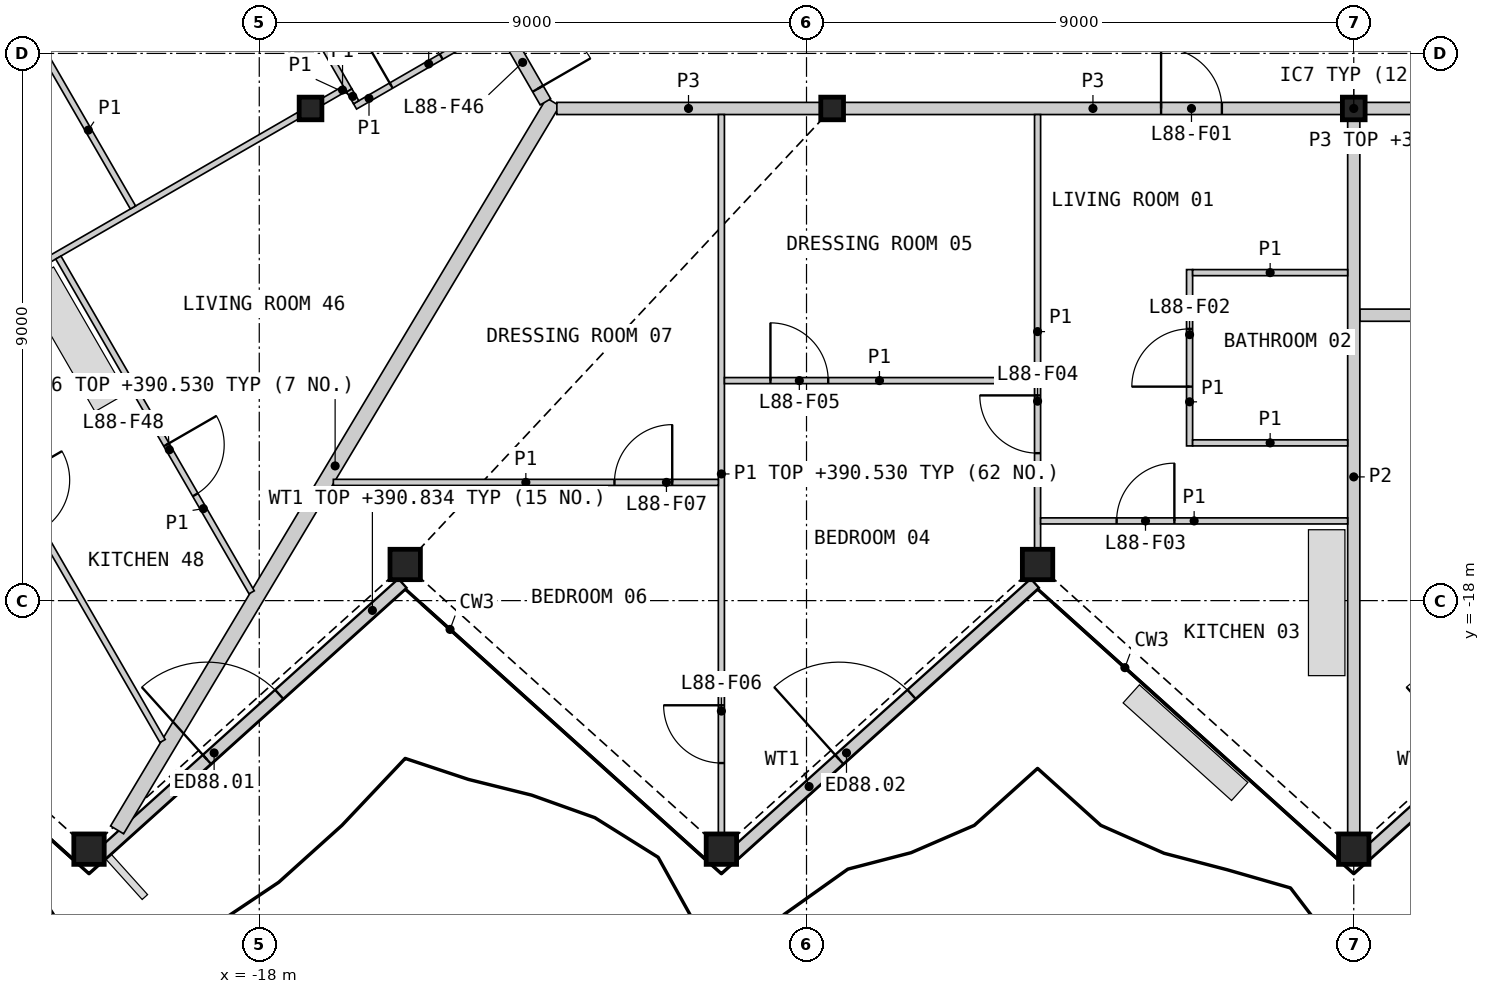
"""IFC4 building model, lengths in metres.
Left out: names, types, materials, properties, quantities, classifications, styles, units other than length and angle.
Written with IfcOpenShell. Run it as: python <this file> out.ifc"""

import sys

from ifc_helpers import new_model, si_unit, direction, frame, frame_2d, origin, origin_2d, place, context, subcontext, project, spatial, rectangle, hollow_rectangle, i_section, extrude, element, fill, save


model = new_model("IFC4")
c1 = context("Model", 3, precision=1e-05, world=origin(), true_north=direction((0.0, 1.0)))
c2 = subcontext(c1, "Body", "Model", "MODEL_VIEW")
j1 = project(units=[si_unit("LENGTHUNIT", "METRE"), si_unit("PLANEANGLEUNIT", "RADIAN")], contexts=[c1])
p1 = place(None, origin())
s1 = spatial("IfcSite", under=j1, at=p1, CompositionType="ELEMENT")
p2 = place(p1, origin())
s2 = spatial("IfcBuilding", under=s1, at=p2, CompositionType="ELEMENT")
p3 = place(p2, frame((0.0, 0.0, 388.2)))
s3 = spatial("IfcBuildingStorey", under=s2, at=p3, CompositionType="ELEMENT", Elevation=388.2)
for number, where, z_axis, x_axis in (
    (1, (-20.8, -22.088, 0.0), (0.0, 0.0, 1.0), (1.0, 0.0, 0.0)),
    (2, (-15.6, -17.406, 0.0), (0.0, 0.0, 1.0), (1.0, 0.0, 0.0)),
    (3, (-10.4, -22.088, 0.0), (0.0, 0.0, 1.0), (1.0, 0.0, 0.0)),
    (4, (-5.2, -17.406, 0.0), (0.0, 0.0, 1.0), (1.0, 0.0, 0.0)),
    (5, (0.0, -22.088, 0.0), (0.0, 0.0, 1.0), (1.0, 0.0, 0.0)),
):
    element("IfcColumn", number, at=place(p3, frame(where, z_axis=z_axis, x_axis=x_axis)), inside=s3, PredefinedType="COLUMN", context=c2, shape_type="SweptSolid", body=[
        extrude(hollow_rectangle(XDim=0.5, YDim=0.5, WallThickness=0.03, at=origin_2d()), origin(), (0.0, 0.0, 1.0), 3.4),
    ])
for number, where, z_axis, x_axis in (
    (6, (-17.157, -9.906, 0.0), (0.0, 0.0, 1.0), (1.0, 0.0, 0.0)),
    (7, (-8.578, -9.906, 0.0), (0.0, 0.0, 1.0), (1.0, 0.0, 0.0)),
    (8, (0.0, -9.906, 0.0), (0.0, 0.0, 1.0), (1.0, 0.0, 0.0)),
):
    element("IfcColumn", number, at=place(p3, frame(where, z_axis=z_axis, x_axis=x_axis)), inside=s3, PredefinedType="COLUMN", context=c2, shape_type="SweptSolid", body=[
        extrude(i_section(OverallWidth=0.374, OverallDepth=0.372, WebThickness=0.016, FlangeThickness=0.026, at=origin_2d()), origin(), (0.0, 0.0, 1.0), 3.4),
    ])
p4 = place(p3, frame((-20.595, -22.173, 0.0), z_axis=(0.0, 0.0, 1.0), x_axis=(0.743135582201, 0.669140871915, 0.0)))
e9 = element("IfcWall", 9, at=p4, inside=s3, PredefinedType="SOLIDWALL", context=c2, shape_type="SweptSolid", body=[
    extrude(rectangle(XDim=6.662, YDim=0.2, at=frame_2d((3.331, 0.0))), origin(), (0.0, 0.0, 1.0), 2.634),
])
p5 = place(p4, frame((2.333, 0.0, 0.0)))
e10 = element("IfcOpeningElement", 10, at=p5, cuts=e9, PredefinedType="OPENING", context=c2, shape_type="SweptSolid", body=[
    extrude(rectangle(XDim=1.6, YDim=2.25, at=frame_2d((0.8, 1.125))), frame((0.0, 0.11, 0.0), z_axis=(0.0, -1.0, 0.0), x_axis=(1.0, 0.0, 0.0)), (0.0, 0.0, 1.0), 0.22),
])
p6 = place(p3, frame((-10.195, -22.173, 0.0), z_axis=(0.0, 0.0, 1.0), x_axis=(0.743119171875, 0.669159096473, 0.0)))
e11 = element("IfcWall", 11, at=p6, inside=s3, PredefinedType="SOLIDWALL", context=c2, shape_type="SweptSolid", body=[
    extrude(rectangle(XDim=6.661, YDim=0.2, at=frame_2d((3.331, 0.0))), origin(), (0.0, 0.0, 1.0), 2.634),
])
p7 = place(p6, frame((2.333, 0.0, 0.0)))
e12 = element("IfcOpeningElement", 12, at=p7, cuts=e11, PredefinedType="OPENING", context=c2, shape_type="SweptSolid", body=[
    extrude(rectangle(XDim=1.6, YDim=2.25, at=frame_2d((0.8, 1.125))), frame((0.0, 0.11, 0.0), z_axis=(0.0, -1.0, 0.0), x_axis=(1.0, 0.0, 0.0)), (0.0, 0.0, 1.0), 0.22),
])
p8 = place(p3, frame((0.205, -22.173, 0.0), z_axis=(0.0, 0.0, 1.0), x_axis=(0.743135582201, 0.669140871915, 0.0)))
e13 = element("IfcWall", 13, at=p8, inside=s3, PredefinedType="SOLIDWALL", context=c2, shape_type="SweptSolid", body=[
    extrude(rectangle(XDim=6.662, YDim=0.2, at=frame_2d((3.331, 0.0))), origin(), (0.0, 0.0, 1.0), 2.634),
])
p9 = place(p8, frame((2.333, 0.0, 0.0)))
e14 = element("IfcOpeningElement", 14, at=p9, cuts=e13, PredefinedType="OPENING", context=c2, shape_type="SweptSolid", body=[
    extrude(rectangle(XDim=1.6, YDim=2.25, at=frame_2d((0.8, 1.125))), frame((0.0, 0.11, 0.0), z_axis=(0.0, -1.0, 0.0), x_axis=(1.0, 0.0, 0.0)), (0.0, 0.0, 1.0), 0.22),
])
p10 = place(p3, frame((-20.338, -21.771, 0.0), z_axis=(0.0, 0.0, 1.0), x_axis=(0.513878217441, 0.857863146218, 0.0)))
e15 = element("IfcWall", 15, at=p10, inside=s3, PredefinedType="PARTITIONING", context=c2, shape_type="SweptSolid", body=[
    extrude(rectangle(XDim=13.956, YDim=0.25, at=frame_2d((6.978, 0.0))), origin(), (0.0, 0.0, 1.0), 2.33),
])
p11 = place(p3, frame((0.197, -9.906, 0.0), z_axis=(0.0, 0.0, 1.0), x_axis=(1.0, 0.0, 0.0)))
e16 = element("IfcWall", 16, at=p11, inside=s3, PredefinedType="PARTITIONING", context=c2, shape_type="SweptSolid", body=[
    extrude(rectangle(XDim=8.185, YDim=0.2, at=frame_2d((4.092, 0.0))), origin(), (0.0, 0.0, 1.0), 3.1),
])
p12 = place(p11, frame((3.567, 0.0, 0.0)))
e17 = element("IfcOpeningElement", 17, at=p12, cuts=e16, PredefinedType="OPENING", context=c2, shape_type="SweptSolid", body=[
    extrude(rectangle(XDim=0.95, YDim=2.1, at=frame_2d((0.475, 1.05))), frame((0.0, 0.11, 0.0), z_axis=(0.0, -1.0, 0.0), x_axis=(1.0, 0.0, 0.0)), (0.0, 0.0, 1.0), 0.22),
])
p13 = place(p3, frame((-8.382, -9.906, 0.0), z_axis=(0.0, 0.0, 1.0), x_axis=(1.0, 0.0, 0.0)))
e18 = element("IfcWall", 18, at=p13, inside=s3, PredefinedType="PARTITIONING", context=c2, shape_type="SweptSolid", body=[
    extrude(rectangle(XDim=8.185, YDim=0.2, at=frame_2d((4.092, 0.0))), origin(), (0.0, 0.0, 1.0), 3.1),
])
p14 = place(p13, frame((5.213, 0.0, 0.0)))
e19 = element("IfcOpeningElement", 19, at=p14, cuts=e18, PredefinedType="OPENING", context=c2, shape_type="SweptSolid", body=[
    extrude(rectangle(XDim=1.0, YDim=2.1, at=frame_2d((0.5, 1.05))), frame((0.0, 0.11, 0.0), z_axis=(0.0, -1.0, 0.0), x_axis=(1.0, 0.0, 0.0)), (0.0, 0.0, 1.0), 0.22),
])
p15 = place(p3, frame((-13.106, -9.906, 0.0), z_axis=(0.0, 0.0, 1.0), x_axis=(1.0, 0.0, 0.0)))
e20 = element("IfcWall", 20, at=p15, inside=s3, PredefinedType="PARTITIONING", context=c2, shape_type="SweptSolid", body=[
    extrude(rectangle(XDim=4.331, YDim=0.2, at=frame_2d((2.165, 0.0))), origin(), (0.0, 0.0, 1.0), 3.1),
])
p16 = place(p3, frame((-15.131, -6.614, 0.0), z_axis=(0.0, 0.0, 1.0), x_axis=(0.499967746641, -0.866044024469, 0.0)))
e21 = element("IfcWall", 21, at=p16, inside=s3, PredefinedType="PARTITIONING", context=c2, shape_type="SweptSolid", body=[
    extrude(rectangle(XDim=3.676, YDim=0.2, at=frame_2d((1.838, 0.0))), origin(), (0.0, 0.0, 1.0), 3.1),
])
p17 = place(p16, frame((2.426, 0.0, 0.0)))
e22 = element("IfcOpeningElement", 22, at=p17, cuts=e21, PredefinedType="OPENING", context=c2, shape_type="SweptSolid", body=[
    extrude(rectangle(XDim=1.0, YDim=2.1, at=frame_2d((0.5, 1.05))), frame((0.0, 0.11, 0.0), z_axis=(0.0, -1.0, 0.0), x_axis=(1.0, 0.0, 0.0)), (0.0, 0.0, 1.0), 0.22),
])
p18 = place(p3, frame((0.1, -13.306, 0.0), z_axis=(0.0, 0.0, 1.0), x_axis=(1.0, 0.0, 0.0)))
e23 = element("IfcWall", 23, at=p18, inside=s3, PredefinedType="PARTITIONING", context=c2, shape_type="SweptSolid", body=[
    extrude(rectangle(XDim=15.094, YDim=0.2, at=frame_2d((7.547, 0.0))), origin(), (0.0, 0.0, 1.0), 2.33),
])
p19 = place(p18, frame((9.781, 0.0, 0.0)))
e24 = element("IfcOpeningElement", 24, at=p19, cuts=e23, PredefinedType="OPENING", context=c2, shape_type="SweptSolid", body=[
    extrude(rectangle(XDim=0.95, YDim=2.1, at=frame_2d((0.475, 1.05))), frame((0.0, 0.11, 0.0), z_axis=(0.0, -1.0, 0.0), x_axis=(1.0, 0.0, 0.0)), (0.0, 0.0, 1.0), 0.22),
])
p20 = place(p3, frame((0.0, -21.828, 0.0), z_axis=(0.0, 0.0, 1.0), x_axis=(0.0, 1.0, 0.0)))
e25 = element("IfcWall", 25, at=p20, inside=s3, PredefinedType="PARTITIONING", context=c2, shape_type="SweptSolid", body=[
    extrude(rectangle(XDim=11.725, YDim=0.2, at=frame_2d((5.863, 0.0))), origin(), (0.0, 0.0, 1.0), 2.33),
])
p21 = place(p3, frame((-10.4, -21.828, 0.0), z_axis=(0.0, 0.0, 1.0), x_axis=(0.0, 1.0, 0.0)))
e26 = element("IfcWall", 26, at=p21, inside=s3, PredefinedType="PARTITIONING", context=c2, shape_type="SweptSolid", body=[
    extrude(rectangle(XDim=11.822, YDim=0.1, at=frame_2d((5.911, 0.0))), origin(), (0.0, 0.0, 1.0), 2.33),
])
p22 = place(p21, frame((1.156, 0.0, 0.0)))
e27 = element("IfcOpeningElement", 27, at=p22, cuts=e26, PredefinedType="OPENING", context=c2, shape_type="SweptSolid", body=[
    extrude(rectangle(XDim=0.95, YDim=2.1, at=frame_2d((0.475, 1.05))), frame((0.0, 0.06, 0.0), z_axis=(0.0, -1.0, 0.0), x_axis=(1.0, 0.0, 0.0)), (0.0, 0.0, 1.0), 0.12),
])
p23 = place(p3, frame((-26.777, -15.46, 0.0), z_axis=(0.0, 0.0, 1.0), x_axis=(0.866019680922, 0.500009912158, 0.0)))
e28 = element("IfcWall", 28, at=p23, inside=s3, PredefinedType="PARTITIONING", context=c2, shape_type="SweptSolid", body=[
    extrude(rectangle(XDim=10.881, YDim=0.1, at=frame_2d((5.44, 0.0))), origin(), (0.0, 0.0, 1.0), 2.33),
])
p24 = place(p23, frame((1.454, 0.0, 0.0)))
e29 = element("IfcOpeningElement", 29, at=p24, cuts=e28, PredefinedType="OPENING", context=c2, shape_type="SweptSolid", body=[
    extrude(rectangle(XDim=0.95, YDim=2.1, at=frame_2d((0.475, 1.05))), frame((0.0, 0.06, 0.0), z_axis=(0.0, -1.0, 0.0), x_axis=(1.0, 0.0, 0.0)), (0.0, 0.0, 1.0), 0.12),
])
p25 = place(p3, frame((-23.462, -13.603, 0.0), z_axis=(0.0, 0.0, 1.0), x_axis=(0.499998111909, -0.866026493871, 0.0)))
e30 = element("IfcWall", 30, at=p25, inside=s3, PredefinedType="PARTITIONING", context=c2, shape_type="SweptSolid", body=[
    extrude(rectangle(XDim=7.743, YDim=0.1, at=frame_2d((3.872, 0.0))), origin(), (0.0, 0.0, 1.0), 2.33),
])
p26 = place(p25, frame((2.788, 0.0, 0.0)))
e31 = element("IfcOpeningElement", 31, at=p26, cuts=e30, PredefinedType="OPENING", context=c2, shape_type="SweptSolid", body=[
    extrude(rectangle(XDim=0.95, YDim=2.1, at=frame_2d((0.475, 1.05))), frame((0.0, 0.06, 0.0), z_axis=(0.0, -1.0, 0.0), x_axis=(1.0, 0.0, 0.0)), (0.0, 0.0, 1.0), 0.12),
])
p27 = place(p3, frame((-5.2, -17.146, 0.0), z_axis=(0.0, 0.0, 1.0), x_axis=(0.0, 1.0, 0.0)))
e32 = element("IfcWall", 32, at=p27, inside=s3, PredefinedType="PARTITIONING", context=c2, shape_type="SweptSolid", body=[
    extrude(rectangle(XDim=7.14, YDim=0.1, at=frame_2d((3.57, 0.0))), origin(), (0.0, 0.0, 1.0), 2.33),
])
p28 = place(p27, frame((1.571, 0.0, 0.0)))
e33 = element("IfcOpeningElement", 33, at=p28, cuts=e32, PredefinedType="OPENING", context=c2, shape_type="SweptSolid", body=[
    extrude(rectangle(XDim=0.95, YDim=2.1, at=frame_2d((0.475, 1.05))), frame((0.0, 0.06, 0.0), z_axis=(0.0, -1.0, 0.0), x_axis=(1.0, 0.0, 0.0)), (0.0, 0.0, 1.0), 0.12),
])
p29 = place(p3, frame((-21.304, -12.358, 0.0), z_axis=(0.0, 0.0, 1.0), x_axis=(0.500000558108, -0.866025081561, 0.0)))
e34 = element("IfcWall", 34, at=p29, inside=s3, PredefinedType="PARTITIONING", context=c2, shape_type="SweptSolid", body=[
    extrude(rectangle(XDim=6.358, YDim=0.1, at=frame_2d((3.179, 0.0))), origin(), (0.0, 0.0, 1.0), 2.33),
])
p30 = place(p29, frame((3.555, 0.0, 0.0)))
e35 = element("IfcOpeningElement", 35, at=p30, cuts=e34, PredefinedType="OPENING", context=c2, shape_type="SweptSolid", body=[
    extrude(rectangle(XDim=0.95, YDim=2.1, at=frame_2d((0.475, 1.05))), frame((0.0, 0.06, 0.0), z_axis=(0.0, -1.0, 0.0), x_axis=(1.0, 0.0, 0.0)), (0.0, 0.0, 1.0), 0.12),
])
p31 = place(p3, frame((-16.781, -16.055, 0.0), z_axis=(0.0, 0.0, 1.0), x_axis=(1.0, 0.0, 0.0)))
e36 = element("IfcWall", 36, at=p31, inside=s3, PredefinedType="PARTITIONING", context=c2, shape_type="SweptSolid", body=[
    extrude(rectangle(XDim=6.332, YDim=0.1, at=frame_2d((3.166, 0.0))), origin(), (0.0, 0.0, 1.0), 2.33),
])
p32 = place(p31, frame((4.623, 0.0, 0.0)))
e37 = element("IfcOpeningElement", 37, at=p32, cuts=e36, PredefinedType="OPENING", context=c2, shape_type="SweptSolid", body=[
    extrude(rectangle(XDim=0.95, YDim=2.1, at=frame_2d((0.475, 1.05))), frame((0.0, 0.06, 0.0), z_axis=(0.0, -1.0, 0.0), x_axis=(1.0, 0.0, 0.0)), (0.0, 0.0, 1.0), 0.12),
])
p33 = place(p3, frame((-5.15, -16.689, 0.0), z_axis=(0.0, 0.0, 1.0), x_axis=(1.0, 0.0, 0.0)))
e38 = element("IfcWall", 38, at=p33, inside=s3, PredefinedType="PARTITIONING", context=c2, shape_type="SweptSolid", body=[
    extrude(rectangle(XDim=5.05, YDim=0.1, at=frame_2d((2.525, 0.0))), origin(), (0.0, 0.0, 1.0), 2.33),
])
p34 = place(p33, frame((1.25, 0.0, 0.0)))
e39 = element("IfcOpeningElement", 39, at=p34, cuts=e38, PredefinedType="OPENING", context=c2, shape_type="SweptSolid", body=[
    extrude(rectangle(XDim=0.95, YDim=2.1, at=frame_2d((0.475, 1.05))), frame((0.0, 0.06, 0.0), z_axis=(0.0, -1.0, 0.0), x_axis=(1.0, 0.0, 0.0)), (0.0, 0.0, 1.0), 0.12),
])
p35 = place(p3, frame((-10.35, -14.382, 0.0), z_axis=(0.0, 0.0, 1.0), x_axis=(1.0, 0.0, 0.0)))
e40 = element("IfcWall", 40, at=p35, inside=s3, PredefinedType="PARTITIONING", context=c2, shape_type="SweptSolid", body=[
    extrude(rectangle(XDim=5.1, YDim=0.1, at=frame_2d((2.55, 0.0))), origin(), (0.0, 0.0, 1.0), 2.33),
])
p36 = place(p35, frame((0.757, 0.0, 0.0)))
e41 = element("IfcOpeningElement", 41, at=p36, cuts=e40, PredefinedType="OPENING", context=c2, shape_type="SweptSolid", body=[
    extrude(rectangle(XDim=0.95, YDim=2.1, at=frame_2d((0.475, 1.05))), frame((0.0, 0.06, 0.0), z_axis=(0.0, -1.0, 0.0), x_axis=(1.0, 0.0, 0.0)), (0.0, 0.0, 1.0), 0.12),
])
p37 = place(p3, frame((-21.546, -8.989, 0.0), z_axis=(0.0, 0.0, 1.0), x_axis=(0.499919039967, -0.866072141036, 0.0)))
e42 = element("IfcWall", 42, at=p37, inside=s3, PredefinedType="PARTITIONING", context=c2, shape_type="SweptSolid", body=[
    extrude(rectangle(XDim=2.938, YDim=0.1, at=frame_2d((1.469, 0.0))), origin(), (0.0, 0.0, 1.0), 2.33),
])
p38 = place(p3, frame((-2.7, -15.456, 0.0), z_axis=(0.0, 0.0, 1.0), x_axis=(0.0, 1.0, 0.0)))
e43 = element("IfcWall", 43, at=p38, inside=s3, PredefinedType="PARTITIONING", context=c2, shape_type="SweptSolid", body=[
    extrude(rectangle(XDim=2.9, YDim=0.1, at=frame_2d((1.45, 0.0))), origin(), (0.0, 0.0, 1.0), 2.33),
])
p39 = place(p38, frame((0.975, 0.0, 0.0)))
e44 = element("IfcOpeningElement", 44, at=p39, cuts=e43, PredefinedType="OPENING", context=c2, shape_type="SweptSolid", body=[
    extrude(rectangle(XDim=0.95, YDim=2.1, at=frame_2d((0.475, 1.05))), frame((0.0, 0.06, 0.0), z_axis=(0.0, -1.0, 0.0), x_axis=(1.0, 0.0, 0.0)), (0.0, 0.0, 1.0), 0.12),
])
for number, where, z_axis, x_axis in (
    (45, (-2.65, -12.606, 0.0), (0.0, 0.0, 1.0), (1.0, 0.0, 0.0)),
    (46, (-2.65, -15.406, 0.0), (0.0, 0.0, 1.0), (1.0, 0.0, 0.0)),
):
    element("IfcWall", number, at=place(p3, frame(where, z_axis=z_axis, x_axis=x_axis)), inside=s3, PredefinedType="PARTITIONING", context=c2, shape_type="SweptSolid", body=[
        extrude(rectangle(XDim=2.55, YDim=0.1, at=frame_2d((1.275, 0.0))), origin(), (0.0, 0.0, 1.0), 2.33),
    ])
p40 = place(p3, frame((-16.425, -9.872, 0.0), z_axis=(0.0, 0.0, 1.0), x_axis=(0.86603978909, 0.499975083092, 0.0)))
e47 = element("IfcWall", 47, at=p40, inside=s3, PredefinedType="PARTITIONING", context=c2, shape_type="SweptSolid", body=[
    extrude(rectangle(XDim=2.649, YDim=0.1, at=frame_2d((1.325, 0.0))), origin(), (0.0, 0.0, 1.0), 2.33),
])
p41 = place(p40, frame((0.686, 0.0, 0.0)))
e48 = element("IfcOpeningElement", 48, at=p41, cuts=e47, PredefinedType="OPENING", context=c2, shape_type="SweptSolid", body=[
    extrude(rectangle(XDim=0.95, YDim=2.1, at=frame_2d((0.475, 1.05))), frame((0.0, 0.06, 0.0), z_axis=(0.0, -1.0, 0.0), x_axis=(1.0, 0.0, 0.0)), (0.0, 0.0, 1.0), 0.12),
])
p42 = place(p3, frame((-17.507, -7.899, 0.0), z_axis=(0.0, 0.0, 1.0), x_axis=(0.500011643316, -0.866018681408, 0.0)))
e49 = element("IfcWall", 49, at=p42, inside=s3, PredefinedType="PARTITIONING", context=c2, shape_type="SweptSolid", body=[
    extrude(rectangle(XDim=1.973, YDim=0.1, at=frame_2d((0.987, 0.0))), origin(), (0.0, 0.0, 1.0), 2.33),
])
p43 = place(p3, frame((-16.96, -9.792, 0.0), z_axis=(0.0, 0.0, 1.0), x_axis=(0.866137484628, 0.499805820016, 0.0)))
e50 = element("IfcWall", 50, at=p43, inside=s3, PredefinedType="PARTITIONING", context=c2, shape_type="SweptSolid", body=[
    extrude(rectangle(XDim=0.423, YDim=0.1, at=frame_2d((0.211, 0.0))), origin(), (0.0, 0.0, 1.0), 2.33),
])
p44 = place(p3, frame((-16.519, -9.61, 0.0), z_axis=(0.0, 0.0, 1.0), x_axis=(0.50245032488, -0.864606078528, 0.0)))
e51 = element("IfcWall", 51, at=p44, inside=s3, PredefinedType="PARTITIONING", context=c2, shape_type="SweptSolid", body=[
    extrude(rectangle(XDim=0.224, YDim=0.1, at=frame_2d((0.112, 0.0))), origin(), (0.0, 0.0, 1.0), 2.33),
])
p45 = place(p5, origin())
e52 = element("IfcDoor", 52, at=p45, inside=s3, OperationType="DOUBLE_DOOR_SINGLE_SWING", PredefinedType="DOOR", context=c2, shape_type="SweptSolid", body=[
    extrude(rectangle(XDim=1.6, YDim=2.25, at=frame_2d((0.8, 1.125))), frame((0.0, 0.025, 0.0), z_axis=(0.0, -1.0, 0.0), x_axis=(1.0, 0.0, 0.0)), (0.0, 0.0, 1.0), 0.05),
])
fill(e10, e52)
p46 = place(p7, origin())
e53 = element("IfcDoor", 53, at=p46, inside=s3, OperationType="DOUBLE_DOOR_SINGLE_SWING", PredefinedType="DOOR", context=c2, shape_type="SweptSolid", body=[
    extrude(rectangle(XDim=1.6, YDim=2.25, at=frame_2d((0.8, 1.125))), frame((0.0, 0.025, 0.0), z_axis=(0.0, -1.0, 0.0), x_axis=(1.0, 0.0, 0.0)), (0.0, 0.0, 1.0), 0.05),
])
fill(e12, e53)
p47 = place(p14, origin())
e54 = element("IfcDoor", 54, at=p47, inside=s3, OperationType="SINGLE_SWING_LEFT", PredefinedType="DOOR", context=c2, shape_type="SweptSolid", body=[
    extrude(rectangle(XDim=1.0, YDim=2.1, at=frame_2d((0.5, 1.05))), frame((0.0, 0.025, 0.0), z_axis=(0.0, -1.0, 0.0), x_axis=(1.0, 0.0, 0.0)), (0.0, 0.0, 1.0), 0.05),
])
fill(e19, e54)
p48 = place(p39, origin())
e55 = element("IfcDoor", 55, at=p48, inside=s3, OperationType="SINGLE_SWING_LEFT", PredefinedType="DOOR", context=c2, shape_type="SweptSolid", body=[
    extrude(rectangle(XDim=0.95, YDim=2.1, at=frame_2d((0.475, 1.05))), frame((0.0, 0.025, 0.0), z_axis=(0.0, -1.0, 0.0), x_axis=(1.0, 0.0, 0.0)), (0.0, 0.0, 1.0), 0.05),
])
fill(e44, e55)
p49 = place(p34, origin())
e56 = element("IfcDoor", 56, at=p49, inside=s3, OperationType="SINGLE_SWING_RIGHT", PredefinedType="DOOR", context=c2, shape_type="SweptSolid", body=[
    extrude(rectangle(XDim=0.95, YDim=2.1, at=frame_2d((0.475, 1.05))), frame((0.0, 0.025, 0.0), z_axis=(0.0, -1.0, 0.0), x_axis=(1.0, 0.0, 0.0)), (0.0, 0.0, 1.0), 0.05),
])
fill(e39, e56)
p50 = place(p28, origin())
e57 = element("IfcDoor", 57, at=p50, inside=s3, OperationType="SINGLE_SWING_RIGHT", PredefinedType="DOOR", context=c2, shape_type="SweptSolid", body=[
    extrude(rectangle(XDim=0.95, YDim=2.1, at=frame_2d((0.475, 1.05))), frame((0.0, 0.025, 0.0), z_axis=(0.0, -1.0, 0.0), x_axis=(1.0, 0.0, 0.0)), (0.0, 0.0, 1.0), 0.05),
])
fill(e33, e57)
p51 = place(p36, origin())
e58 = element("IfcDoor", 58, at=p51, inside=s3, OperationType="SINGLE_SWING_LEFT", PredefinedType="DOOR", context=c2, shape_type="SweptSolid", body=[
    extrude(rectangle(XDim=0.95, YDim=2.1, at=frame_2d((0.475, 1.05))), frame((0.0, 0.025, 0.0), z_axis=(0.0, -1.0, 0.0), x_axis=(1.0, 0.0, 0.0)), (0.0, 0.0, 1.0), 0.05),
])
fill(e41, e58)
p52 = place(p22, origin())
e59 = element("IfcDoor", 59, at=p52, inside=s3, OperationType="SINGLE_SWING_RIGHT", PredefinedType="DOOR", context=c2, shape_type="SweptSolid", body=[
    extrude(rectangle(XDim=0.95, YDim=2.1, at=frame_2d((0.475, 1.05))), frame((0.0, 0.025, 0.0), z_axis=(0.0, -1.0, 0.0), x_axis=(1.0, 0.0, 0.0)), (0.0, 0.0, 1.0), 0.05),
])
fill(e27, e59)
p53 = place(p32, origin())
e60 = element("IfcDoor", 60, at=p53, inside=s3, OperationType="SINGLE_SWING_RIGHT", PredefinedType="DOOR", context=c2, shape_type="SweptSolid", body=[
    extrude(rectangle(XDim=0.95, YDim=2.1, at=frame_2d((0.475, 1.05))), frame((0.0, 0.025, 0.0), z_axis=(0.0, -1.0, 0.0), x_axis=(1.0, 0.0, 0.0)), (0.0, 0.0, 1.0), 0.05),
])
fill(e37, e60)
p54 = place(p17, origin())
e61 = element("IfcDoor", 61, at=p54, inside=s3, OperationType="SINGLE_SWING_RIGHT", PredefinedType="DOOR", context=c2, shape_type="SweptSolid", body=[
    extrude(rectangle(XDim=1.0, YDim=2.1, at=frame_2d((0.5, 1.05))), frame((0.0, 0.025, 0.0), z_axis=(0.0, -1.0, 0.0), x_axis=(1.0, 0.0, 0.0)), (0.0, 0.0, 1.0), 0.05),
])
fill(e22, e61)
p55 = place(p41, origin())
e62 = element("IfcDoor", 62, at=p55, inside=s3, OperationType="SINGLE_SWING_LEFT", PredefinedType="DOOR", context=c2, shape_type="SweptSolid", body=[
    extrude(rectangle(XDim=0.95, YDim=2.1, at=frame_2d((0.475, 1.05))), frame((0.0, 0.025, 0.0), z_axis=(0.0, -1.0, 0.0), x_axis=(1.0, 0.0, 0.0)), (0.0, 0.0, 1.0), 0.05),
])
fill(e48, e62)
p56 = place(p30, origin())
e63 = element("IfcDoor", 63, at=p56, inside=s3, OperationType="SINGLE_SWING_LEFT", PredefinedType="DOOR", context=c2, shape_type="SweptSolid", body=[
    extrude(rectangle(XDim=0.95, YDim=2.1, at=frame_2d((0.475, 1.05))), frame((0.0, 0.025, 0.0), z_axis=(0.0, -1.0, 0.0), x_axis=(1.0, 0.0, 0.0)), (0.0, 0.0, 1.0), 0.05),
])
fill(e35, e63)
save(model, sys.argv[1])
